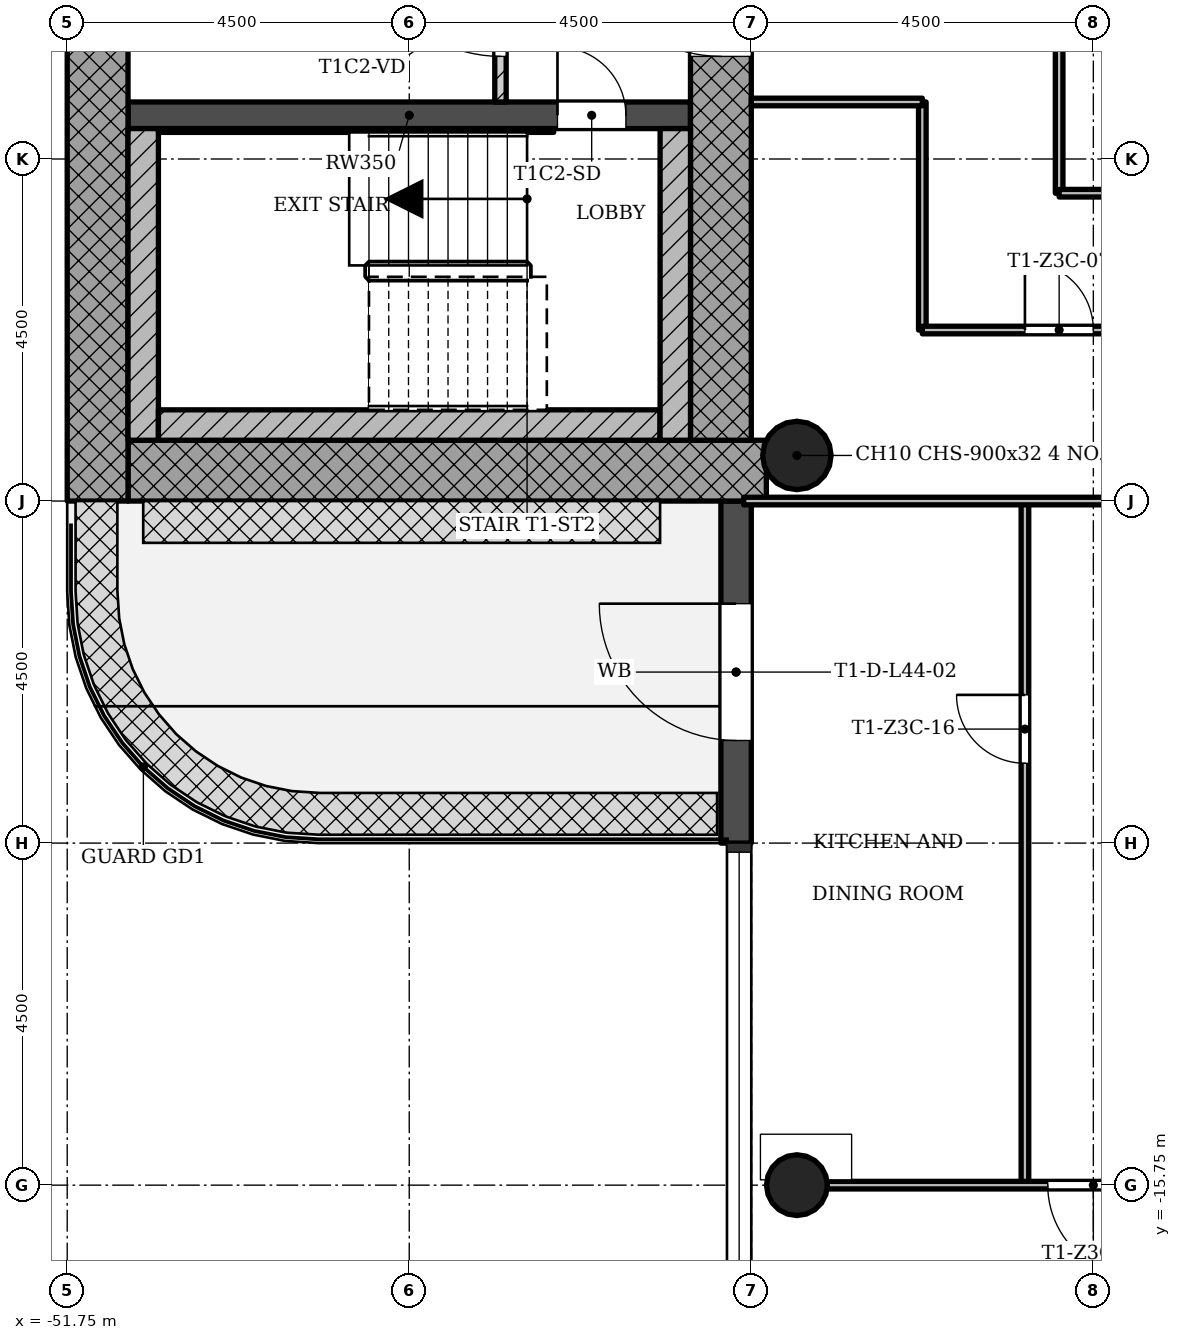
"""IFC4 building model, lengths in metres.
Left out: names, types, materials, properties, quantities, classifications, styles, units other than length and angle.
Written with IfcOpenShell. Run it as: python <this file> out.ifc"""

import sys

from ifc_helpers import new_model, si_unit, direction, frame, frame_2d, origin, origin_2d, place, context, subcontext, project, spatial, rectangle, hollow_circle, extrude, element, fill, save


model = new_model("IFC4")
c1 = context("Model", 3, precision=1e-05, world=origin(), true_north=direction((0.0, 1.0)))
c2 = subcontext(c1, "Body", "Model", "MODEL_VIEW")
j1 = project(units=[si_unit("LENGTHUNIT", "METRE"), si_unit("PLANEANGLEUNIT", "RADIAN")], contexts=[c1])
p1 = place(None, origin())
s1 = spatial("IfcSite", under=j1, at=p1, CompositionType="ELEMENT")
p2 = place(p1, origin())
s2 = spatial("IfcBuilding", under=s1, at=p2, CompositionType="ELEMENT")
p3 = place(p2, frame((0.0, 0.0, 160.9)))
s3 = spatial("IfcBuildingStorey", under=s2, at=p3, CompositionType="ELEMENT", Elevation=160.9)
p4 = place(p3, frame((-50.95, -6.35, 0.0), z_axis=(0.0, 0.0, 1.0), x_axis=(1.0, 0.0, 0.0)))
e1 = element("IfcWall", 1, at=p4, inside=s3, PredefinedType="SHEAR", context=c2, shape_type="SweptSolid", body=[
    extrude(rectangle(XDim=8.398, YDim=0.8, at=frame_2d((4.199, 0.0))), origin(), (0.0, 0.0, 1.0), 3.4),
])
p5 = place(p3, frame((-43.15, -5.95, 0.0), z_axis=(0.0, 0.0, 1.0), x_axis=(0.0, 1.0, 0.0)))
e2 = element("IfcWall", 2, at=p5, inside=s3, PredefinedType="SHEAR", context=c2, shape_type="SweptSolid", body=[
    extrude(rectangle(XDim=12.7, YDim=0.8, at=frame_2d((6.35, 0.0))), origin(), (0.0, 0.0, 1.0), 3.4),
])
p6 = place(p5, frame((5.05, 0.0, 0.0)))
e3 = element("IfcOpeningElement", 3, at=p6, cuts=e2, PredefinedType="OPENING", context=c2, shape_type="SweptSolid", body=[
    extrude(rectangle(XDim=1.8, YDim=2.1, at=frame_2d((0.9, 1.05))), frame((0.0, 0.41, 0.0), z_axis=(0.0, -1.0, 0.0), x_axis=(1.0, 0.0, 0.0)), (0.0, 0.0, 1.0), 0.82),
])
p7 = place(p3, frame((-51.35, 5.95, 0.0), z_axis=(0.0, 0.0, 1.0), x_axis=(0.0, -1.0, 0.0)))
e4 = element("IfcWall", 4, at=p7, inside=s3, PredefinedType="SHEAR", context=c2, shape_type="SweptSolid", body=[
    extrude(rectangle(XDim=12.7, YDim=0.8, at=frame_2d((6.35, 0.0))), origin(), (0.0, 0.0, 1.0), 3.4),
])
p8 = place(p7, frame((5.5, 0.0, 0.45)))
e5 = element("IfcOpeningElement", 5, at=p8, cuts=e4, PredefinedType="OPENING", context=c2, shape_type="SweptSolid", body=[
    extrude(rectangle(XDim=0.9, YDim=2.4, at=frame_2d((0.45, 1.2))), frame((0.0, 0.41, 0.0), z_axis=(0.0, -1.0, 0.0), x_axis=(1.0, 0.0, 0.0)), (0.0, 0.0, 1.0), 0.82),
])
p9 = place(p3, frame((-50.95, -1.675, 0.0), z_axis=(0.0, 0.0, 1.0), x_axis=(1.0, 0.0, 0.0)))
e6 = element("IfcWall", 6, at=p9, inside=s3, PredefinedType="SHEAR", context=c2, shape_type="SweptSolid", body=[
    extrude(rectangle(XDim=7.4, YDim=0.35, at=frame_2d((3.7, 0.0))), origin(), (0.0, 0.0, 1.0), 3.4),
])
p10 = place(p9, frame((5.65, 0.0, 0.0)))
e7 = element("IfcOpeningElement", 7, at=p10, cuts=e6, PredefinedType="OPENING", context=c2, shape_type="SweptSolid", body=[
    extrude(rectangle(XDim=0.9, YDim=2.1, at=frame_2d((0.45, 1.05))), frame((0.0, 0.185, 0.0), z_axis=(0.0, -1.0, 0.0), x_axis=(1.0, 0.0, 0.0)), (0.0, 0.0, 1.0), 0.37),
])
p11 = place(p3, frame((-42.15, -15.75, 0.0), z_axis=(0.0, 0.0, 1.0), x_axis=(1.0, 0.0, 0.0)))
e8 = element("IfcColumn", 8, at=p11, inside=s3, PredefinedType="COLUMN", context=c2, shape_type="SweptSolid", body=[
    extrude(hollow_circle(Radius=0.4, WallThickness=0.028, at=origin_2d()), origin(), (0.0, 0.0, 1.0), 3.4),
])
p12 = place(p3, frame((-42.15, -6.15, 0.0), z_axis=(0.0, 0.0, 1.0), x_axis=(1.0, 0.0, 0.0)))
e9 = element("IfcColumn", 9, at=p12, inside=s3, PredefinedType="COLUMN", context=c2, shape_type="SweptSolid", body=[
    extrude(hollow_circle(Radius=0.45, WallThickness=0.032, at=origin_2d()), origin(), (0.0, 0.0, 1.0), 3.4),
])
p13 = place(p3, frame((-42.95, -6.75, -0.02), z_axis=(0.0, 0.0, 1.0), x_axis=(0.0, -1.0, 0.0)))
e10 = element("IfcWall", 10, at=p13, inside=s3, PredefinedType="STANDARD", context=c2, shape_type="SweptSolid", body=[
    extrude(rectangle(XDim=4.5, YDim=0.4, at=frame_2d((2.25, 0.0))), origin(), (0.0, 0.0, 1.0), 3.12),
])
p14 = place(p13, frame((1.35, 0.0, 0.02)))
e11 = element("IfcOpeningElement", 11, at=p14, cuts=e10, PredefinedType="OPENING", context=c2, shape_type="SweptSolid", body=[
    extrude(rectangle(XDim=1.8, YDim=2.1, at=frame_2d((0.9, 1.05))), frame((0.0, 0.21, 0.0), z_axis=(0.0, -1.0, 0.0), x_axis=(1.0, 0.0, 0.0)), (0.0, 0.0, 1.0), 0.42),
])
p15 = place(p3, frame((-46.05, 1.5, 0.0), z_axis=(0.0, 0.0, 1.0), x_axis=(0.0, -1.0, 0.0)))
e12 = element("IfcWall", 12, at=p15, inside=s3, PredefinedType="PARTITIONING", context=c2, shape_type="SweptSolid", body=[
    extrude(rectangle(XDim=3.0, YDim=0.15, at=frame_2d((1.5, 0.0))), origin(), (0.0, 0.0, 1.0), 3.0),
])
p16 = place(p15, frame((0.6, 0.0, 0.0)))
e13 = element("IfcOpeningElement", 13, at=p16, cuts=e12, PredefinedType="OPENING", context=c2, shape_type="SweptSolid", body=[
    extrude(rectangle(XDim=1.8, YDim=2.1, at=frame_2d((0.9, 1.05))), frame((0.0, 0.085, 0.0), z_axis=(0.0, -1.0, 0.0), x_axis=(1.0, 0.0, 0.0)), (0.0, 0.0, 1.0), 0.17),
])
p17 = place(p3, frame((-40.5, -4.5, 0.0), z_axis=(0.0, 0.0, 1.0), x_axis=(0.0, 1.0, 0.0)))
e14 = element("IfcWall", 14, at=p17, inside=s3, PredefinedType="PARTITIONING", context=c2, shape_type="SweptSolid", body=[
    extrude(rectangle(XDim=3.0, YDim=0.1, at=frame_2d((1.5, 0.0))), origin(), (0.0, 0.0, 1.0), 3.0),
])
p18 = place(p3, frame((-39.15, -15.75, 0.0), z_axis=(0.0, 0.0, 1.0), x_axis=(0.0, 1.0, 0.0)))
e15 = element("IfcWall", 15, at=p18, inside=s3, PredefinedType="PARTITIONING", context=c2, shape_type="SweptSolid", body=[
    extrude(rectangle(XDim=9.0, YDim=0.1, at=frame_2d((4.5, 0.0))), origin(), (0.0, 0.0, 1.0), 3.0),
])
p19 = place(p18, frame((5.55, 0.0, 0.0)))
e16 = element("IfcOpeningElement", 16, at=p19, cuts=e15, PredefinedType="OPENING", context=c2, shape_type="SweptSolid", body=[
    extrude(rectangle(XDim=0.9, YDim=2.1, at=frame_2d((0.45, 1.05))), frame((0.0, 0.06, 0.0), z_axis=(0.0, -1.0, 0.0), x_axis=(1.0, 0.0, 0.0)), (0.0, 0.0, 1.0), 0.12),
])
p20 = place(p3, frame((-38.7, -2.7, 0.0), z_axis=(0.0, 0.0, 1.0), x_axis=(0.0, 1.0, 0.0)))
e17 = element("IfcWall", 17, at=p20, inside=s3, PredefinedType="PARTITIONING", context=c2, shape_type="SweptSolid", body=[
    extrude(rectangle(XDim=5.4, YDim=0.1, at=frame_2d((2.7, 0.0))), origin(), (0.0, 0.0, 1.0), 3.0),
])
p21 = place(p3, frame((-41.75, -15.75, 0.0), z_axis=(0.0, 0.0, 1.0), x_axis=(1.0, 0.0, 0.0)))
e18 = element("IfcWall", 18, at=p21, inside=s3, PredefinedType="PARTITIONING", context=c2, shape_type="SweptSolid", body=[
    extrude(rectangle(XDim=4.4, YDim=0.1, at=frame_2d((2.2, 0.0))), origin(), (0.0, 0.0, 1.0), 3.0),
])
p22 = place(p21, frame((2.9, 0.0, 0.0)))
e19 = element("IfcOpeningElement", 19, at=p22, cuts=e18, PredefinedType="OPENING", context=c2, shape_type="SweptSolid", body=[
    extrude(rectangle(XDim=1.2, YDim=2.1, at=frame_2d((0.6, 1.05))), frame((0.0, 0.06, 0.0), z_axis=(0.0, -1.0, 0.0), x_axis=(1.0, 0.0, 0.0)), (0.0, 0.0, 1.0), 0.12),
])
p23 = place(p3, frame((-42.85, -6.75, 0.0), z_axis=(0.0, 0.0, 1.0), x_axis=(1.0, 0.0, 0.0)))
e20 = element("IfcWall", 20, at=p23, inside=s3, PredefinedType="PARTITIONING", context=c2, shape_type="SweptSolid", body=[
    extrude(rectangle(XDim=5.95, YDim=0.1, at=frame_2d((2.975, 0.0))), origin(), (0.0, 0.0, 1.0), 3.0),
])
p24 = place(p3, frame((-40.5, -4.5, 0.0), z_axis=(0.0, 0.0, 1.0), x_axis=(1.0, 0.0, 0.0)))
e21 = element("IfcWall", 21, at=p24, inside=s3, PredefinedType="PARTITIONING", context=c2, shape_type="SweptSolid", body=[
    extrude(rectangle(XDim=3.6, YDim=0.1, at=frame_2d((1.8, 0.0))), origin(), (0.0, 0.0, 1.0), 3.0),
])
p25 = place(p24, frame((1.35, 0.0, 0.0)))
e22 = element("IfcOpeningElement", 22, at=p25, cuts=e21, PredefinedType="OPENING", context=c2, shape_type="SweptSolid", body=[
    extrude(rectangle(XDim=0.9, YDim=2.1, at=frame_2d((0.45, 1.05))), frame((0.0, 0.06, 0.0), z_axis=(0.0, -1.0, 0.0), x_axis=(1.0, 0.0, 0.0)), (0.0, 0.0, 1.0), 0.12),
])
p26 = place(p3, frame((-38.7, -2.7, 0.0), z_axis=(0.0, 0.0, 1.0), x_axis=(1.0, 0.0, 0.0)))
e23 = element("IfcWall", 23, at=p26, inside=s3, PredefinedType="PARTITIONING", context=c2, shape_type="SweptSolid", body=[
    extrude(rectangle(XDim=5.4, YDim=0.1, at=frame_2d((2.7, 0.0))), origin(), (0.0, 0.0, 1.0), 3.0),
])
p27 = place(p3, frame((-42.75, -1.5, 0.0), z_axis=(0.0, 0.0, 1.0), x_axis=(1.0, 0.0, 0.0)))
e24 = element("IfcWall", 24, at=p27, inside=s3, PredefinedType="PARTITIONING", context=c2, shape_type="SweptSolid", body=[
    extrude(rectangle(XDim=2.25, YDim=0.1, at=frame_2d((1.125, 0.0))), origin(), (0.0, 0.0, 1.0), 3.0),
])
p28 = place(p3, frame((-50.75, -1.85, 0.0), z_axis=(0.0, 0.0, 1.0), x_axis=(0.0, -1.0, 0.0)))
e25 = element("IfcWall", 25, at=p28, inside=s3, PredefinedType="SHEAR", context=c2, shape_type="SweptSolid", body=[
    extrude(rectangle(XDim=4.1, YDim=0.4, at=frame_2d((2.05, 0.0))), origin(), (0.0, 0.0, 1.0), 3.4),
])
p29 = place(p3, frame((-43.95, -5.75, 0.0), z_axis=(0.0, 0.0, 1.0), x_axis=(-1.0, 0.0, 0.0)))
e26 = element("IfcWall", 26, at=p29, inside=s3, PredefinedType="SHEAR", context=c2, shape_type="SweptSolid", body=[
    extrude(rectangle(XDim=6.6, YDim=0.4, at=frame_2d((3.3, 0.0))), origin(), (0.0, 0.0, 1.0), 3.4),
])
p30 = place(p3, frame((-43.75, -1.85, 0.0), z_axis=(0.0, 0.0, 1.0), x_axis=(0.0, -1.0, 0.0)))
e27 = element("IfcWall", 27, at=p30, inside=s3, PredefinedType="SHEAR", context=c2, shape_type="SweptSolid", body=[
    extrude(rectangle(XDim=4.1, YDim=0.4, at=frame_2d((2.05, 0.0))), origin(), (0.0, 0.0, 1.0), 3.4),
])
p31 = place(p3, frame((-45.35, -1.875, 0.0), z_axis=(0.0, 0.0, 1.0), x_axis=(-1.0, 0.0, 0.0)))
e28 = element("IfcWall", 28, at=p31, inside=s3, PredefinedType="SHEAR", context=c2, shape_type="SweptSolid", body=[
    extrude(rectangle(XDim=5.2, YDim=0.05, at=frame_2d((2.6, 0.0))), origin(), (0.0, 0.0, 1.0), 3.4),
])
p32 = place(p14, origin())
e29 = element("IfcDoor", 29, at=p32, inside=s3, OperationType="SINGLE_SWING_LEFT", PredefinedType="DOOR", context=c2, shape_type="SweptSolid", body=[
    extrude(rectangle(XDim=1.8, YDim=2.1, at=frame_2d((0.9, 1.05))), frame((0.0, 0.025, 0.0), z_axis=(0.0, -1.0, 0.0), x_axis=(1.0, 0.0, 0.0)), (0.0, 0.0, 1.0), 0.05),
])
fill(e11, e29)
p33 = place(p16, origin())
e30 = element("IfcDoor", 30, at=p33, inside=s3, OperationType="SINGLE_SWING_LEFT", PredefinedType="DOOR", context=c2, shape_type="SweptSolid", body=[
    extrude(rectangle(XDim=1.8, YDim=2.1, at=frame_2d((0.9, 1.05))), frame((0.0, 0.025, 0.0), z_axis=(0.0, -1.0, 0.0), x_axis=(1.0, 0.0, 0.0)), (0.0, 0.0, 1.0), 0.05),
])
fill(e13, e30)
p34 = place(p25, origin())
e31 = element("IfcDoor", 31, at=p34, inside=s3, OperationType="SINGLE_SWING_RIGHT", PredefinedType="DOOR", context=c2, shape_type="SweptSolid", body=[
    extrude(rectangle(XDim=0.9, YDim=2.1, at=frame_2d((0.45, 1.05))), frame((0.0, 0.025, 0.0), z_axis=(0.0, -1.0, 0.0), x_axis=(1.0, 0.0, 0.0)), (0.0, 0.0, 1.0), 0.05),
])
fill(e22, e31)
p35 = place(p19, origin())
e32 = element("IfcDoor", 32, at=p35, inside=s3, OperationType="SINGLE_SWING_LEFT", PredefinedType="DOOR", context=c2, shape_type="SweptSolid", body=[
    extrude(rectangle(XDim=0.9, YDim=2.1, at=frame_2d((0.45, 1.05))), frame((0.0, 0.025, 0.0), z_axis=(0.0, -1.0, 0.0), x_axis=(1.0, 0.0, 0.0)), (0.0, 0.0, 1.0), 0.05),
])
fill(e16, e32)
p36 = place(p22, origin())
e33 = element("IfcDoor", 33, at=p36, inside=s3, OperationType="SINGLE_SWING_RIGHT", PredefinedType="DOOR", context=c2, shape_type="SweptSolid", body=[
    extrude(rectangle(XDim=1.2, YDim=2.1, at=frame_2d((0.6, 1.05))), frame((0.0, 0.025, 0.0), z_axis=(0.0, -1.0, 0.0), x_axis=(1.0, 0.0, 0.0)), (0.0, 0.0, 1.0), 0.05),
])
fill(e19, e33)
p37 = place(p10, origin())
e34 = element("IfcDoor", 34, at=p37, inside=s3, OperationType="SINGLE_SWING_RIGHT", PredefinedType="DOOR", context=c2, shape_type="SweptSolid", body=[
    extrude(rectangle(XDim=0.9, YDim=2.1, at=frame_2d((0.45, 1.05))), frame((0.0, 0.025, 0.0), z_axis=(0.0, -1.0, 0.0), x_axis=(1.0, 0.0, 0.0)), (0.0, 0.0, 1.0), 0.05),
])
fill(e7, e34)
p38 = place(p6, origin())
e35 = element("IfcDoor", 35, at=p38, inside=s3, OperationType="SINGLE_SWING_LEFT", PredefinedType="DOOR", context=c2, shape_type="SweptSolid", body=[
    extrude(rectangle(XDim=1.8, YDim=2.1, at=frame_2d((0.9, 1.05))), frame((0.0, 0.025, 0.0), z_axis=(0.0, -1.0, 0.0), x_axis=(1.0, 0.0, 0.0)), (0.0, 0.0, 1.0), 0.05),
])
fill(e3, e35)
save(model, sys.argv[1])
